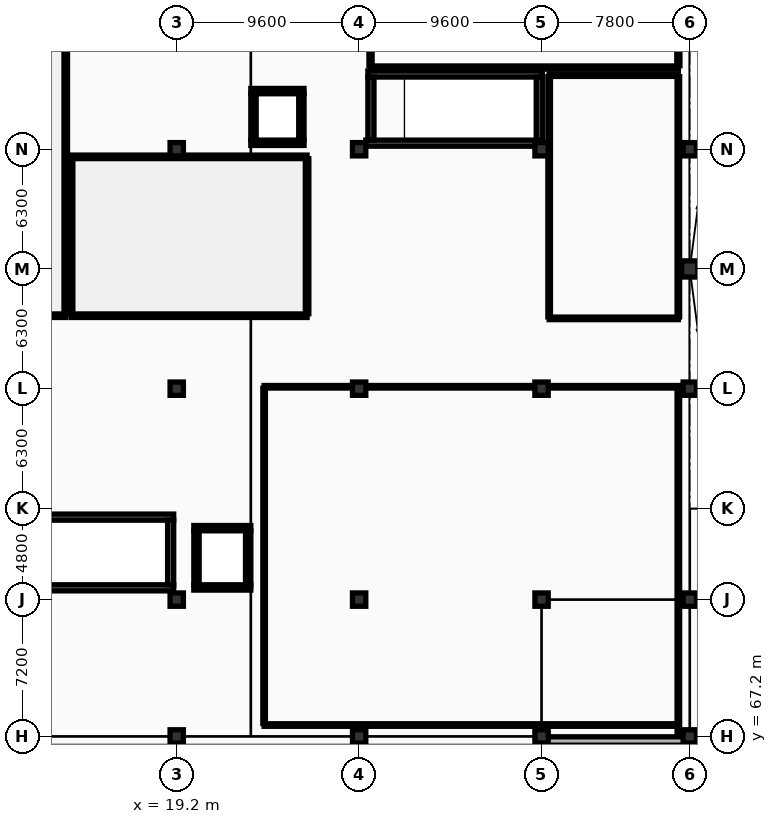
"""IFC4 building model, lengths in metres.
Left out: names, types, materials, properties, quantities, classifications, styles, units other than length and angle.
Written with IfcOpenShell. Run it as: python <this file> out.ifc"""

import sys

from ifc_helpers import new_model, si_unit, direction, frame, frame_2d, origin, origin_2d, place, context, subcontext, project, spatial, rectangle, circle, extrude, element, fill, save


model = new_model("IFC4")
c1 = context("Model", 3, precision=1e-05, world=origin(), true_north=direction((0.0, 1.0)))
c2 = subcontext(c1, "Body", "Model", "MODEL_VIEW")
j1 = project(units=[si_unit("LENGTHUNIT", "METRE"), si_unit("PLANEANGLEUNIT", "RADIAN")], contexts=[c1])
p1 = place(None, origin())
s1 = spatial("IfcSite", under=j1, at=p1, CompositionType="ELEMENT")
p2 = place(p1, origin())
s2 = spatial("IfcBuilding", under=s1, at=p2, CompositionType="ELEMENT")
p3 = place(p2, frame((0.0, 0.0, 5.4)))
s3 = spatial("IfcBuildingStorey", under=s2, at=p3, CompositionType="ELEMENT", Elevation=5.4)
p4 = place(p3, frame((46.2, 91.8, 0.0), z_axis=(0.0, 0.0, 1.0), x_axis=(1.0, 0.0, 0.0)))
e1 = element("IfcColumn", 1, at=p4, inside=s3, PredefinedType="COLUMN", context=c2, shape_type="SweptSolid", body=[
    extrude(circle(Radius=0.425, at=origin_2d()), origin(), (0.0, 0.0, 1.0), 4.5),
])
for number, where, z_axis, x_axis in (
    (2, (19.2, 67.2, 0.0), (0.0, 0.0, 1.0), (1.0, 0.0, 0.0)),
    (3, (19.2, 74.4, 0.0), (0.0, 0.0, 1.0), (1.0, 0.0, 0.0)),
    (4, (19.2, 85.5, 0.0), (0.0, 0.0, 1.0), (1.0, 0.0, 0.0)),
    (5, (19.2, 98.1, 0.0), (0.0, 0.0, 1.0), (1.0, 0.0, 0.0)),
    (6, (28.8, 67.2, 0.0), (0.0, 0.0, 1.0), (1.0, 0.0, 0.0)),
    (7, (28.8, 74.4, 0.0), (0.0, 0.0, 1.0), (1.0, 0.0, 0.0)),
    (8, (28.8, 85.5, 0.0), (0.0, 0.0, 1.0), (1.0, 0.0, 0.0)),
    (9, (28.8, 98.1, 0.0), (0.0, 0.0, 1.0), (1.0, 0.0, 0.0)),
    (10, (38.4, 67.2, 0.0), (0.0, 0.0, 1.0), (1.0, 0.0, 0.0)),
    (11, (38.4, 74.4, 0.0), (0.0, 0.0, 1.0), (1.0, 0.0, 0.0)),
    (12, (38.4, 85.5, 0.0), (0.0, 0.0, 1.0), (1.0, 0.0, 0.0)),
    (13, (38.4, 98.1, 0.0), (0.0, 0.0, 1.0), (1.0, 0.0, 0.0)),
    (14, (46.2, 67.2, 0.0), (0.0, 0.0, 1.0), (1.0, 0.0, 0.0)),
    (15, (46.2, 74.4, 0.0), (0.0, 0.0, 1.0), (1.0, 0.0, 0.0)),
    (16, (46.2, 85.5, 0.0), (0.0, 0.0, 1.0), (1.0, 0.0, 0.0)),
    (17, (46.2, 98.1, 0.0), (0.0, 0.0, 1.0), (1.0, 0.0, 0.0)),
):
    element("IfcColumn", number, at=place(p3, frame(where, z_axis=z_axis, x_axis=x_axis)), inside=s3, PredefinedType="COLUMN", context=c2, shape_type="SweptSolid", body=[
        extrude(rectangle(XDim=0.7, YDim=0.7, at=origin_2d()), origin(), (0.0, 0.0, 1.0), 4.5),
    ])
p5 = place(p3, frame((38.45, 66.96, 0.0), z_axis=(0.0, 0.0, 1.0), x_axis=(1.0, 0.0, 0.0)))
e18 = element("IfcWall", 18, at=p5, inside=s3, PredefinedType="STANDARD", context=c2, shape_type="SweptSolid", body=[
    extrude(rectangle(XDim=7.55, YDim=0.44, at=frame_2d((3.775, 0.0))), origin(), (0.0, 0.0, 1.0), 3.23),
])
for number, where, z_axis, x_axis in (
    (19, (9.86, 78.74, 0.0), (0.0, 0.0, 1.0), (1.0, 0.0, 0.0)),
    (20, (19.04, 75.02, 0.0), (0.0, 0.0, 1.0), (-1.0, 0.0, 0.0)),
):
    element("IfcWall", number, at=place(p3, frame(where, z_axis=z_axis, x_axis=x_axis)), inside=s3, PredefinedType="SHEAR", context=c2, shape_type="SweptSolid", body=[
        extrude(rectangle(XDim=9.18, YDim=0.32, at=frame_2d((4.59, 0.0))), origin(), (0.0, 0.0, 1.0), 4.24),
    ])
p6 = place(p3, frame((18.88, 78.58, 0.0), z_axis=(0.0, 0.0, 1.0), x_axis=(0.0, -1.0, 0.0)))
e21 = element("IfcWall", 21, at=p6, inside=s3, PredefinedType="SHEAR", context=c2, shape_type="SweptSolid", body=[
    extrude(rectangle(XDim=3.4, YDim=0.32, at=frame_2d((1.7, 0.0))), origin(), (0.0, 0.0, 1.0), 4.24),
])
p7 = place(p3, frame((29.26, 102.06, 0.0), z_axis=(0.0, 0.0, 1.0), x_axis=(1.0, 0.0, 0.0)))
e22 = element("IfcWall", 22, at=p7, inside=s3, PredefinedType="SHEAR", context=c2, shape_type="SweptSolid", body=[
    extrude(rectangle(XDim=9.18, YDim=0.32, at=frame_2d((4.59, 0.0))), origin(), (0.0, 0.0, 1.0), 4.24),
])
p8 = place(p3, frame((38.44, 98.42, 0.0), z_axis=(0.0, 0.0, 1.0), x_axis=(-1.0, 0.0, 0.0)))
e23 = element("IfcWall", 23, at=p8, inside=s3, PredefinedType="SHEAR", context=c2, shape_type="SweptSolid", body=[
    extrude(rectangle(XDim=9.29, YDim=0.32, at=frame_2d((4.645, 0.0))), origin(), (0.0, 0.0, 1.0), 4.24),
])
p9 = place(p3, frame((29.42, 98.58, 0.0), z_axis=(0.0, 0.0, 1.0), x_axis=(0.0, 1.0, 0.0)))
e24 = element("IfcWall", 24, at=p9, inside=s3, PredefinedType="SHEAR", context=c2, shape_type="SweptSolid", body=[
    extrude(rectangle(XDim=3.32, YDim=0.32, at=frame_2d((1.66, 0.0))), origin(), (0.0, 0.0, 1.0), 4.24),
])
p10 = place(p9, frame((1.085, 0.0, 0.0)))
e25 = element("IfcOpeningElement", 25, at=p10, cuts=e24, PredefinedType="OPENING", context=c2, shape_type="SweptSolid", body=[
    extrude(rectangle(XDim=1.15, YDim=2.2, at=frame_2d((0.575, 1.1))), frame((0.0, 0.17, 0.0), z_axis=(0.0, -1.0, 0.0), x_axis=(1.0, 0.0, 0.0)), (0.0, 0.0, 1.0), 0.34),
])
p11 = place(p3, frame((38.28, 101.9, 0.0), z_axis=(0.0, 0.0, 1.0), x_axis=(0.0, -1.0, 0.0)))
e26 = element("IfcWall", 26, at=p11, inside=s3, PredefinedType="SHEAR", context=c2, shape_type="SweptSolid", body=[
    extrude(rectangle(XDim=3.32, YDim=0.32, at=frame_2d((1.66, 0.0))), origin(), (0.0, 0.0, 1.0), 4.24),
])
p12 = place(p3, frame((20.1, 78.16, 0.0), z_axis=(0.0, 0.0, 1.0), x_axis=(1.0, 0.0, 0.0)))
e27 = element("IfcWall", 27, at=p12, inside=s3, PredefinedType="SHEAR", context=c2, shape_type="SweptSolid", body=[
    extrude(rectangle(XDim=3.0, YDim=0.28, at=frame_2d((1.5, 0.0))), origin(), (0.0, 0.0, 1.0), 4.24),
])
p13 = place(p12, frame((0.975, 0.0, 0.0)))
e28 = element("IfcOpeningElement", 28, at=p13, cuts=e27, PredefinedType="OPENING", context=c2, shape_type="SweptSolid", body=[
    extrude(rectangle(XDim=1.05, YDim=2.2, at=frame_2d((0.525, 1.1))), frame((0.0, 0.15, 0.0), z_axis=(0.0, -1.0, 0.0), x_axis=(1.0, 0.0, 0.0)), (0.0, 0.0, 1.0), 0.3),
])
p14 = place(p3, frame((23.1, 75.04, 0.0), z_axis=(0.0, 0.0, 1.0), x_axis=(-1.0, 0.0, 0.0)))
e29 = element("IfcWall", 29, at=p14, inside=s3, PredefinedType="SHEAR", context=c2, shape_type="SweptSolid", body=[
    extrude(rectangle(XDim=3.0, YDim=0.28, at=frame_2d((1.5, 0.0))), origin(), (0.0, 0.0, 1.0), 4.24),
])
for number, where, z_axis, x_axis in (
    (30, (20.24, 75.18, 0.0), (0.0, 0.0, 1.0), (0.0, 1.0, 0.0)),
    (31, (22.96, 78.02, 0.0), (0.0, 0.0, 1.0), (0.0, -1.0, 0.0)),
):
    element("IfcWall", number, at=place(p3, frame(where, z_axis=z_axis, x_axis=x_axis)), inside=s3, PredefinedType="SHEAR", context=c2, shape_type="SweptSolid", body=[
        extrude(rectangle(XDim=2.84, YDim=0.28, at=frame_2d((1.42, 0.0))), origin(), (0.0, 0.0, 1.0), 4.24),
    ])
p15 = place(p3, frame((23.1, 101.16, 0.0), z_axis=(0.0, 0.0, 1.0), x_axis=(1.0, 0.0, 0.0)))
e32 = element("IfcWall", 32, at=p15, inside=s3, PredefinedType="SHEAR", context=c2, shape_type="SweptSolid", body=[
    extrude(rectangle(XDim=2.8, YDim=0.28, at=frame_2d((1.4, 0.0))), origin(), (0.0, 0.0, 1.0), 4.24),
])
p16 = place(p3, frame((25.9, 98.44, 0.0), z_axis=(0.0, 0.0, 1.0), x_axis=(-1.0, 0.0, 0.0)))
e33 = element("IfcWall", 33, at=p16, inside=s3, PredefinedType="SHEAR", context=c2, shape_type="SweptSolid", body=[
    extrude(rectangle(XDim=2.8, YDim=0.28, at=frame_2d((1.4, 0.0))), origin(), (0.0, 0.0, 1.0), 4.24),
])
p17 = place(p16, frame((0.925, 0.0, 0.0)))
e34 = element("IfcOpeningElement", 34, at=p17, cuts=e33, PredefinedType="OPENING", context=c2, shape_type="SweptSolid", body=[
    extrude(rectangle(XDim=0.95, YDim=2.15, at=frame_2d((0.475, 1.075))), frame((0.0, 0.15, 0.0), z_axis=(0.0, -1.0, 0.0), x_axis=(1.0, 0.0, 0.0)), (0.0, 0.0, 1.0), 0.3),
])
for number, where, z_axis, x_axis in (
    (35, (23.24, 98.58, 0.0), (0.0, 0.0, 1.0), (0.0, 1.0, 0.0)),
    (36, (25.76, 101.02, 0.0), (0.0, 0.0, 1.0), (0.0, -1.0, 0.0)),
):
    element("IfcWall", number, at=place(p3, frame(where, z_axis=z_axis, x_axis=x_axis)), inside=s3, PredefinedType="SHEAR", context=c2, shape_type="SweptSolid", body=[
        extrude(rectangle(XDim=2.44, YDim=0.28, at=frame_2d((1.22, 0.0))), origin(), (0.0, 0.0, 1.0), 4.24),
    ])
p18 = place(p3, frame((13.36, 89.34, 0.0), z_axis=(0.0, 0.0, 1.0), x_axis=(-1.0, 0.0, 0.0)))
e37 = element("IfcWall", 37, at=p18, inside=s3, PredefinedType="PARTITIONING", context=c2, shape_type="SweptSolid", body=[
    extrude(rectangle(XDim=12.886, YDim=0.185, at=frame_2d((6.443, 0.0))), origin(), (0.0, 0.0, 1.0), 3.33),
])
p19 = place(p18, frame((1.878, 0.0, 0.0)))
e38 = element("IfcOpeningElement", 38, at=p19, cuts=e37, PredefinedType="OPENING", context=c2, shape_type="SweptSolid", body=[
    extrude(rectangle(XDim=2.0, YDim=2.5, at=frame_2d((1.0, 1.25))), frame((0.0, 0.103, 0.0), z_axis=(0.0, -1.0, 0.0), x_axis=(1.0, 0.0, 0.0)), (0.0, 0.0, 1.0), 0.205),
])
p20 = place(p3, frame((13.36, 112.326, 0.0), z_axis=(0.0, 0.0, 1.0), x_axis=(0.0, -1.0, 0.0)))
e39 = element("IfcWall", 39, at=p20, inside=s3, PredefinedType="PARTITIONING", context=c2, shape_type="SweptSolid", body=[
    extrude(rectangle(XDim=22.884, YDim=0.185, at=frame_2d((11.442, 0.0))), origin(), (0.0, 0.0, 1.0), 3.43),
])
p21 = place(p3, frame((13.64, 97.7, 0.0), z_axis=(0.0, 0.0, 1.0), x_axis=(1.0, 0.0, 0.0)))
e40 = element("IfcWall", 40, at=p21, inside=s3, PredefinedType="PARTITIONING", context=c2, shape_type="SweptSolid", body=[
    extrude(rectangle(XDim=12.42, YDim=0.185, at=frame_2d((6.21, 0.0))), origin(), (0.0, 0.0, 1.0), 3.28),
])
p22 = place(p3, frame((26.06, 89.34, 0.0), z_axis=(0.0, 0.0, 1.0), x_axis=(-1.0, 0.0, 0.0)))
e41 = element("IfcWall", 41, at=p22, inside=s3, PredefinedType="PARTITIONING", context=c2, shape_type="SweptSolid", body=[
    extrude(rectangle(XDim=12.42, YDim=0.185, at=frame_2d((6.21, 0.0))), origin(), (0.0, 0.0, 1.0), 3.33),
])
p23 = place(p22, frame((1.808, 0.0, 0.0)))
e42 = element("IfcOpeningElement", 42, at=p23, cuts=e41, PredefinedType="OPENING", context=c2, shape_type="SweptSolid", body=[
    extrude(rectangle(XDim=2.0, YDim=2.5, at=frame_2d((1.0, 1.25))), frame((0.0, 0.103, 0.0), z_axis=(0.0, -1.0, 0.0), x_axis=(1.0, 0.0, 0.0)), (0.0, 0.0, 1.0), 0.205),
])
for number, where, z_axis, x_axis in (
    (43, (13.64, 89.442, 0.0), (0.0, 0.0, 1.0), (0.0, 1.0, 0.0)),
    (44, (26.06, 97.597, 0.0), (0.0, 0.0, 1.0), (0.0, -1.0, 0.0)),
):
    element("IfcWall", number, at=place(p3, frame(where, z_axis=z_axis, x_axis=x_axis)), inside=s3, PredefinedType="PARTITIONING", context=c2, shape_type="SweptSolid", body=[
        extrude(rectangle(XDim=8.155, YDim=0.185, at=frame_2d((4.078, 0.0))), origin(), (0.0, 0.0, 1.0), 3.58),
    ])
p24 = place(p3, frame((45.6, 102.4, 0.0), z_axis=(0.0, 0.0, 1.0), x_axis=(-1.0, 0.0, 0.0)))
e45 = element("IfcWall", 45, at=p24, inside=s3, PredefinedType="PARTITIONING", context=c2, shape_type="SweptSolid", body=[
    extrude(rectangle(XDim=16.2, YDim=0.165, at=frame_2d((8.1, 0.0))), origin(), (0.0, 0.0, 1.0), 3.28),
])
p25 = place(p3, frame((29.4, 102.492, 0.0), z_axis=(0.0, 0.0, 1.0), x_axis=(0.0, 1.0, 0.0)))
e46 = element("IfcWall", 46, at=p25, inside=s3, PredefinedType="PARTITIONING", context=c2, shape_type="SweptSolid", body=[
    extrude(rectangle(XDim=9.833, YDim=0.165, at=frame_2d((4.917, 0.0))), origin(), (0.0, 0.0, 1.0), 3.58),
])
p26 = place(p25, frame((1.977, 0.0, 0.0)))
e47 = element("IfcOpeningElement", 47, at=p26, cuts=e46, PredefinedType="OPENING", context=c2, shape_type="SweptSolid", body=[
    extrude(rectangle(XDim=1.0, YDim=2.15, at=frame_2d((0.5, 1.075))), frame((0.0, 0.093, 0.0), z_axis=(0.0, -1.0, 0.0), x_axis=(1.0, 0.0, 0.0)), (0.0, 0.0, 1.0), 0.185),
])
p27 = place(p3, frame((45.6, 112.326, 0.0), z_axis=(0.0, 0.0, 1.0), x_axis=(0.0, -1.0, 0.0)))
e48 = element("IfcWall", 48, at=p27, inside=s3, PredefinedType="PARTITIONING", context=c2, shape_type="SweptSolid", body=[
    extrude(rectangle(XDim=9.833, YDim=0.165, at=frame_2d((4.917, 0.0))), origin(), (0.0, 0.0, 1.0), 3.62),
])
p28 = place(p3, frame((38.8, 102.0, 0.0), z_axis=(0.0, 0.0, 1.0), x_axis=(1.0, 0.0, 0.0)))
e49 = element("IfcWall", 49, at=p28, inside=s3, PredefinedType="PARTITIONING", context=c2, shape_type="SweptSolid", body=[
    extrude(rectangle(XDim=6.8, YDim=0.135, at=frame_2d((3.4, 0.0))), origin(), (0.0, 0.0, 1.0), 3.28),
])
p29 = place(p3, frame((45.6, 89.2, 0.0), z_axis=(0.0, 0.0, 1.0), x_axis=(-1.0, 0.0, 0.0)))
e50 = element("IfcWall", 50, at=p29, inside=s3, PredefinedType="PARTITIONING", context=c2, shape_type="SweptSolid", body=[
    extrude(rectangle(XDim=6.8, YDim=0.135, at=frame_2d((3.4, 0.0))), origin(), (0.0, 0.0, 1.0), 3.33),
])
p30 = place(p29, frame((2.153, 0.0, 0.0)))
e51 = element("IfcOpeningElement", 51, at=p30, cuts=e50, PredefinedType="OPENING", context=c2, shape_type="SweptSolid", body=[
    extrude(rectangle(XDim=0.95, YDim=2.15, at=frame_2d((0.475, 1.075))), frame((0.0, 0.077, 0.0), z_axis=(0.0, -1.0, 0.0), x_axis=(1.0, 0.0, 0.0)), (0.0, 0.0, 1.0), 0.155),
])
p31 = place(p3, frame((38.8, 89.278, 0.0), z_axis=(0.0, 0.0, 1.0), x_axis=(0.0, 1.0, 0.0)))
e52 = element("IfcWall", 52, at=p31, inside=s3, PredefinedType="PARTITIONING", context=c2, shape_type="SweptSolid", body=[
    extrude(rectangle(XDim=12.645, YDim=0.135, at=frame_2d((6.323, 0.0))), origin(), (0.0, 0.0, 1.0), 3.28),
])
p32 = place(p3, frame((45.6, 101.923, 0.0), z_axis=(0.0, 0.0, 1.0), x_axis=(0.0, -1.0, 0.0)))
e53 = element("IfcWall", 53, at=p32, inside=s3, PredefinedType="PARTITIONING", context=c2, shape_type="SweptSolid", body=[
    extrude(rectangle(XDim=12.645, YDim=0.135, at=frame_2d((6.323, 0.0))), origin(), (0.0, 0.0, 1.0), 3.57),
])
p33 = place(p3, frame((23.8, 85.6, 0.0), z_axis=(0.0, 0.0, 1.0), x_axis=(1.0, 0.0, 0.0)))
e54 = element("IfcWall", 54, at=p33, inside=s3, PredefinedType="PARTITIONING", context=c2, shape_type="SweptSolid", body=[
    extrude(rectangle(XDim=21.8, YDim=0.135, at=frame_2d((10.9, 0.0))), origin(), (0.0, 0.0, 1.0), 3.33),
])
p34 = place(p33, frame((8.382, 0.0, 0.0)))
e55 = element("IfcOpeningElement", 55, at=p34, cuts=e54, PredefinedType="OPENING", context=c2, shape_type="SweptSolid", body=[
    extrude(rectangle(XDim=1.02, YDim=2.15, at=frame_2d((0.51, 1.075))), frame((0.0, 0.077, 0.0), z_axis=(0.0, -1.0, 0.0), x_axis=(1.0, 0.0, 0.0)), (0.0, 0.0, 1.0), 0.155),
])
p35 = place(p3, frame((45.6, 67.8, 0.0), z_axis=(0.0, 0.0, 1.0), x_axis=(-1.0, 0.0, 0.0)))
e56 = element("IfcWall", 56, at=p35, inside=s3, PredefinedType="PARTITIONING", context=c2, shape_type="SweptSolid", body=[
    extrude(rectangle(XDim=21.8, YDim=0.135, at=frame_2d((10.9, 0.0))), origin(), (0.0, 0.0, 1.0), 3.68),
])
p36 = place(p3, frame((23.8, 67.877, 0.0), z_axis=(0.0, 0.0, 1.0), x_axis=(0.0, 1.0, 0.0)))
e57 = element("IfcWall", 57, at=p36, inside=s3, PredefinedType="PARTITIONING", context=c2, shape_type="SweptSolid", body=[
    extrude(rectangle(XDim=17.645, YDim=0.135, at=frame_2d((8.823, 0.0))), origin(), (0.0, 0.0, 1.0), 3.43),
])
p37 = place(p3, frame((45.6, 85.522, 0.0), z_axis=(0.0, 0.0, 1.0), x_axis=(0.0, -1.0, 0.0)))
e58 = element("IfcWall", 58, at=p37, inside=s3, PredefinedType="PARTITIONING", context=c2, shape_type="SweptSolid", body=[
    extrude(rectangle(XDim=18.103, YDim=0.135, at=frame_2d((9.051, 0.0))), origin(), (0.0, 0.0, 1.0), 3.57),
])
p38 = place(p10, origin())
e59 = element("IfcDoor", 59, at=p38, inside=s3, OperationType="SINGLE_SWING_LEFT", PredefinedType="DOOR", context=c2, shape_type="SweptSolid", body=[
    extrude(rectangle(XDim=1.15, YDim=2.2, at=frame_2d((0.575, 1.1))), frame((0.0, 0.025, 0.0), z_axis=(0.0, -1.0, 0.0), x_axis=(1.0, 0.0, 0.0)), (0.0, 0.0, 1.0), 0.05),
])
fill(e25, e59)
p39 = place(p13, origin())
e60 = element("IfcDoor", 60, at=p39, inside=s3, OperationType="DOUBLE_DOOR_SLIDING", PredefinedType="DOOR", context=c2, shape_type="SweptSolid", body=[
    extrude(rectangle(XDim=1.05, YDim=2.2, at=frame_2d((0.525, 1.1))), frame((0.0, 0.025, 0.0), z_axis=(0.0, -1.0, 0.0), x_axis=(1.0, 0.0, 0.0)), (0.0, 0.0, 1.0), 0.05),
])
fill(e28, e60)
p40 = place(p17, origin())
e61 = element("IfcDoor", 61, at=p40, inside=s3, OperationType="DOUBLE_DOOR_SLIDING", PredefinedType="DOOR", context=c2, shape_type="SweptSolid", body=[
    extrude(rectangle(XDim=0.95, YDim=2.15, at=frame_2d((0.475, 1.075))), frame((0.0, 0.025, 0.0), z_axis=(0.0, -1.0, 0.0), x_axis=(1.0, 0.0, 0.0)), (0.0, 0.0, 1.0), 0.05),
])
fill(e34, e61)
p41 = place(p23, origin())
e62 = element("IfcDoor", 62, at=p41, inside=s3, OperationType="DOUBLE_DOOR_SINGLE_SWING", PredefinedType="DOOR", context=c2, shape_type="SweptSolid", body=[
    extrude(rectangle(XDim=2.0, YDim=2.5, at=frame_2d((1.0, 1.25))), frame((0.0, 0.025, 0.0), z_axis=(0.0, -1.0, 0.0), x_axis=(1.0, 0.0, 0.0)), (0.0, 0.0, 1.0), 0.05),
])
fill(e42, e62)
p42 = place(p30, origin())
e63 = element("IfcDoor", 63, at=p42, inside=s3, OperationType="SINGLE_SWING_RIGHT", PredefinedType="DOOR", context=c2, shape_type="SweptSolid", body=[
    extrude(rectangle(XDim=0.95, YDim=2.15, at=frame_2d((0.475, 1.075))), frame((0.0, 0.025, 0.0), z_axis=(0.0, -1.0, 0.0), x_axis=(1.0, 0.0, 0.0)), (0.0, 0.0, 1.0), 0.05),
])
fill(e51, e63)
p43 = place(p34, origin())
e64 = element("IfcDoor", 64, at=p43, inside=s3, OperationType="SINGLE_SWING_LEFT", PredefinedType="DOOR", context=c2, shape_type="SweptSolid", body=[
    extrude(rectangle(XDim=1.02, YDim=2.15, at=frame_2d((0.51, 1.075))), frame((0.0, 0.025, 0.0), z_axis=(0.0, -1.0, 0.0), x_axis=(1.0, 0.0, 0.0)), (0.0, 0.0, 1.0), 0.05),
])
fill(e55, e64)
save(model, sys.argv[1])
